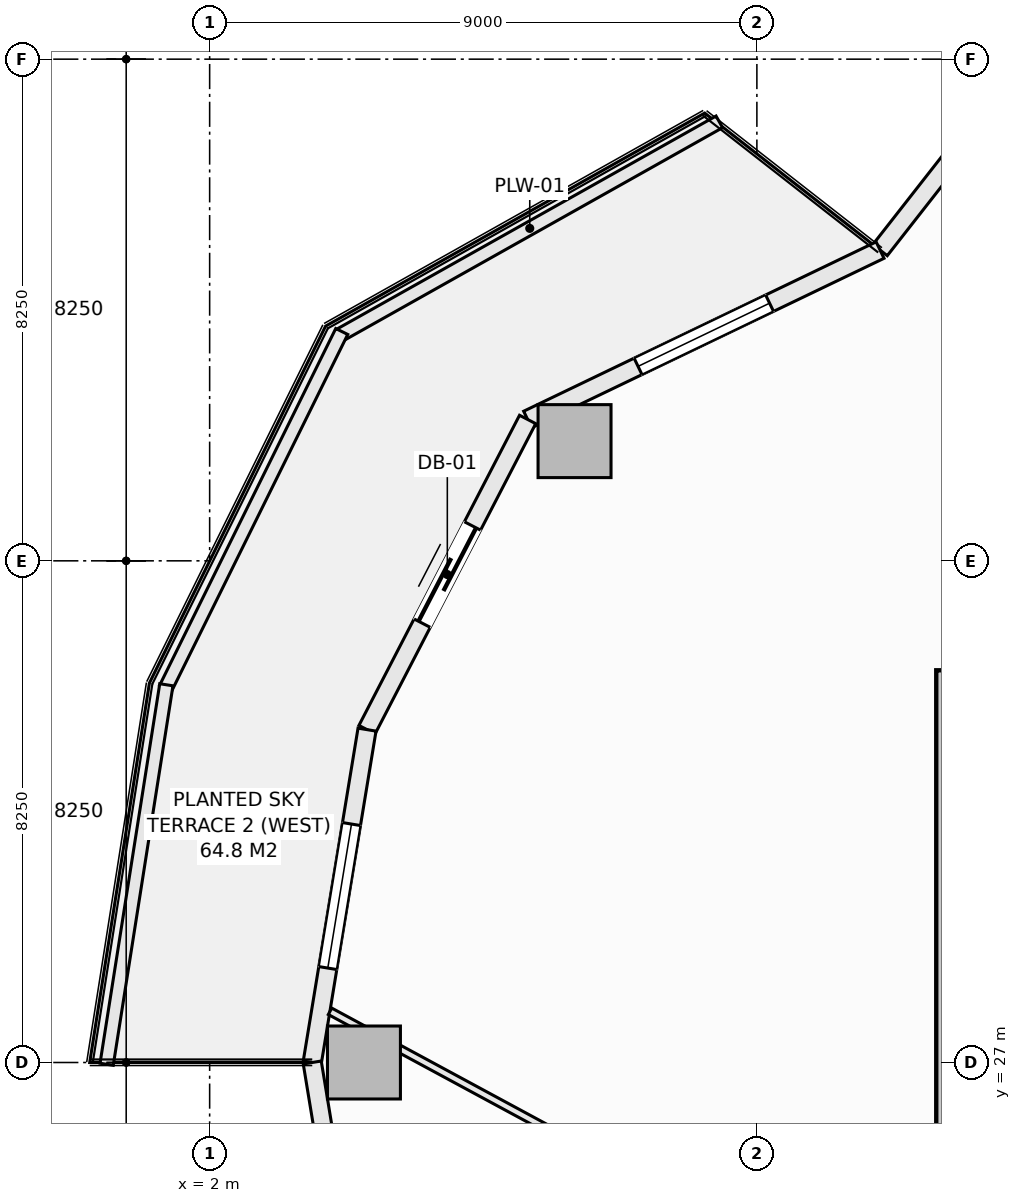
"""IFC4 building model, lengths in metres.
Left out: names, types, materials, properties, quantities, classifications, styles, units other than length and angle.
Written with IfcOpenShell. Run it as: python <this file> out.ifc"""

import sys

from ifc_helpers import new_model, si_unit, direction, frame, frame_2d, origin, origin_2d, place, context, subcontext, project, spatial, rectangle, extrude, element, fill, save


model = new_model("IFC4")
c1 = context("Model", 3, precision=1e-05, world=origin(), true_north=direction((0.0, 1.0)))
c2 = subcontext(c1, "Body", "Model", "MODEL_VIEW")
j1 = project(units=[si_unit("LENGTHUNIT", "METRE"), si_unit("PLANEANGLEUNIT", "RADIAN")], contexts=[c1])
p1 = place(None, origin())
s1 = spatial("IfcSite", under=j1, at=p1, CompositionType="ELEMENT")
p2 = place(p1, origin())
s2 = spatial("IfcBuilding", under=s1, at=p2, CompositionType="ELEMENT")
p3 = place(p2, frame((0.0, 0.0, 88.1)))
s3 = spatial("IfcBuildingStorey", under=s2, at=p3, CompositionType="ELEMENT", Elevation=88.1)
p4 = place(p3, frame((14.375, 20.55, -0.28), z_axis=(0.0, 0.0, 1.0), x_axis=(0.0, 1.0, 0.0)))
e1 = element("IfcWall", 1, at=p4, inside=s3, PredefinedType="SHEAR", context=c2, shape_type="SweptSolid", body=[
    extrude(rectangle(XDim=12.9, YDim=0.85, at=frame_2d((6.45, 0.0))), origin(), (0.0, 0.0, 1.0), 3.85),
])
for number, where, z_axis, x_axis in (
    (2, (8.001, 37.219, -0.28), (0.0, 0.0, 1.0), (1.0, 0.0, 0.0)),
    (3, (4.538, 27.0, -0.28), (0.0, 0.0, 1.0), (1.0, 0.0, 0.0)),
):
    element("IfcColumn", number, at=place(p3, frame(where, z_axis=z_axis, x_axis=x_axis)), inside=s3, PredefinedType="COLUMN", context=c2, shape_type="SweptSolid", body=[
        extrude(rectangle(XDim=1.2, YDim=1.2, at=origin_2d()), origin(), (0.0, 0.0, 1.0), 3.85),
    ])
p5 = place(p3, frame((13.026, 40.36, 0.0), z_axis=(0.0, 0.0, 1.0), x_axis=(0.616434798832, 0.78740595552, 0.0)))
e4 = element("IfcWall", 4, at=p5, inside=s3, PredefinedType="SOLIDWALL", context=c2, shape_type="SweptSolid", body=[
    extrude(rectangle(XDim=6.294, YDim=0.3, at=frame_2d((3.147, 0.0))), origin(), (0.0, 0.0, 1.0), 3.093),
])
p6 = place(p5, frame((1.947, 0.0, 0.85)))
e5 = element("IfcOpeningElement", 5, at=p6, cuts=e4, PredefinedType="OPENING", context=c2, shape_type="SweptSolid", body=[
    extrude(rectangle(XDim=2.4, YDim=1.9, at=frame_2d((1.2, 0.95))), frame((0.0, 0.16, 0.0), z_axis=(0.0, -1.0, 0.0), x_axis=(1.0, 0.0, 0.0)), (0.0, 0.0, 1.0), 0.32),
])
p7 = place(p3, frame((7.229, 37.575, 0.0), z_axis=(0.0, 0.0, 1.0), x_axis=(0.901354747727, 0.433081538224, 0.0)))
e6 = element("IfcWall", 6, at=p7, inside=s3, PredefinedType="SOLIDWALL", context=c2, shape_type="SweptSolid", body=[
    extrude(rectangle(XDim=6.431, YDim=0.3, at=frame_2d((3.215, 0.0))), origin(), (0.0, 0.0, 1.0), 3.093),
])
p8 = place(p7, frame((2.015, 0.0, 0.85)))
e7 = element("IfcOpeningElement", 7, at=p8, cuts=e6, PredefinedType="OPENING", context=c2, shape_type="SweptSolid", body=[
    extrude(rectangle(XDim=2.4, YDim=1.9, at=frame_2d((1.2, 0.95))), frame((0.0, 0.16, 0.0), z_axis=(0.0, -1.0, 0.0), x_axis=(1.0, 0.0, 0.0)), (0.0, 0.0, 1.0), 0.32),
])
p9 = place(p3, frame((4.588, 32.474, 0.0), z_axis=(0.0, 0.0, 1.0), x_axis=(0.459800981414, 0.888021991558, 0.0)))
e8 = element("IfcWall", 8, at=p9, inside=s3, PredefinedType="SOLIDWALL", context=c2, shape_type="SweptSolid", body=[
    extrude(rectangle(XDim=5.744, YDim=0.3, at=frame_2d((2.872, 0.0))), origin(), (0.0, 0.0, 1.0), 3.093),
])
p10 = place(p9, frame((1.972, 0.0, 0.0)))
e9 = element("IfcOpeningElement", 9, at=p10, cuts=e8, PredefinedType="OPENING", context=c2, shape_type="SweptSolid", body=[
    extrude(rectangle(XDim=1.8, YDim=2.25, at=frame_2d((0.9, 1.125))), frame((0.0, 0.16, 0.0), z_axis=(0.0, -1.0, 0.0), x_axis=(1.0, 0.0, 0.0)), (0.0, 0.0, 1.0), 0.32),
])
p11 = place(p3, frame((3.688, 27.0, 0.0), z_axis=(0.0, 0.0, 1.0), x_axis=(0.162386212206, 0.986727276447, 0.0)))
e10 = element("IfcWall", 10, at=p11, inside=s3, PredefinedType="SOLIDWALL", context=c2, shape_type="SweptSolid", body=[
    extrude(rectangle(XDim=5.548, YDim=0.3, at=frame_2d((2.774, 0.0))), origin(), (0.0, 0.0, 1.0), 3.093),
])
p12 = place(p11, frame((1.574, 0.0, 0.85)))
e11 = element("IfcOpeningElement", 11, at=p12, cuts=e10, PredefinedType="OPENING", context=c2, shape_type="SweptSolid", body=[
    extrude(rectangle(XDim=2.4, YDim=1.9, at=frame_2d((1.2, 0.95))), frame((0.0, 0.16, 0.0), z_axis=(0.0, -1.0, 0.0), x_axis=(1.0, 0.0, 0.0)), (0.0, 0.0, 1.0), 0.32),
])
p13 = place(p3, frame((3.688, 27.0, 0.0), z_axis=(0.0, 0.0, 1.0), x_axis=(0.162386212206, -0.986727276447, 0.0)))
e12 = element("IfcWall", 12, at=p13, inside=s3, PredefinedType="SOLIDWALL", context=c2, shape_type="SweptSolid", body=[
    extrude(rectangle(XDim=5.548, YDim=0.3, at=frame_2d((2.774, 0.0))), origin(), (0.0, 0.0, 1.0), 3.093),
])
p14 = place(p13, frame((1.574, 0.0, 0.85)))
e13 = element("IfcOpeningElement", 13, at=p14, cuts=e12, PredefinedType="OPENING", context=c2, shape_type="SweptSolid", body=[
    extrude(rectangle(XDim=2.4, YDim=1.9, at=frame_2d((1.2, 0.95))), frame((0.0, 0.16, 0.0), z_axis=(0.0, -1.0, 0.0), x_axis=(1.0, 0.0, 0.0)), (0.0, 0.0, 1.0), 0.32),
])
p15 = place(p3, frame((4.147, 38.966, 0.0), z_axis=(0.0, 0.0, 1.0), x_axis=(0.871775109335, 0.489906275468, 0.0)))
e14 = element("IfcWall", 14, at=p15, inside=s3, PredefinedType="PARAPET", context=c2, shape_type="SweptSolid", body=[
    extrude(rectangle(XDim=7.152, YDim=0.22, at=frame_2d((3.576, 0.0))), origin(), (0.0, 0.0, 1.0), 0.52),
])
p16 = place(p3, frame((1.275, 33.153, 0.0), z_axis=(0.0, 0.0, 1.0), x_axis=(0.442686636348, 0.89667638644, 0.0)))
e15 = element("IfcWall", 15, at=p16, inside=s3, PredefinedType="PARAPET", context=c2, shape_type="SweptSolid", body=[
    extrude(rectangle(XDim=6.545, YDim=0.22, at=frame_2d((3.272, 0.0))), origin(), (0.0, 0.0, 1.0), 0.52),
])
p17 = place(p3, frame((0.306, 26.971, 0.0), z_axis=(0.0, 0.0, 1.0), x_axis=(0.15545655238, 0.987842730561, 0.0)))
e16 = element("IfcWall", 16, at=p17, inside=s3, PredefinedType="PARAPET", context=c2, shape_type="SweptSolid", body=[
    extrude(rectangle(XDim=6.318, YDim=0.22, at=frame_2d((3.159, 0.0))), origin(), (0.0, 0.0, 1.0), 0.52),
])
p18 = place(p3, frame((3.98, 27.842, 0.0), z_axis=(0.0, 0.0, 1.0), x_axis=(0.87986629228, -0.475221324974, 0.0)))
e17 = element("IfcWall", 17, at=p18, inside=s3, PredefinedType="PARTITIONING", context=c2, shape_type="SweptSolid", body=[
    extrude(rectangle(XDim=11.329, YDim=0.12, at=frame_2d((5.665, 0.0))), origin(), (0.0, 0.0, 1.0), 2.934),
])
p19 = place(p8, origin())
e18 = element("IfcWindow", 18, at=p19, inside=s3, PartitioningType="SINGLE_PANEL", PredefinedType="WINDOW", context=c2, shape_type="SweptSolid", body=[
    extrude(rectangle(XDim=2.4, YDim=1.9, at=frame_2d((1.2, 0.95))), frame((0.0, 0.03, 0.0), z_axis=(0.0, -1.0, 0.0), x_axis=(1.0, 0.0, 0.0)), (0.0, 0.0, 1.0), 0.06),
])
fill(e7, e18)
p20 = place(p10, origin())
e19 = element("IfcDoor", 19, at=p20, inside=s3, OperationType="SLIDING_TO_LEFT", PredefinedType="DOOR", context=c2, shape_type="SweptSolid", body=[
    extrude(rectangle(XDim=1.8, YDim=2.25, at=frame_2d((0.9, 1.125))), frame((0.0, 0.025, 0.0), z_axis=(0.0, -1.0, 0.0), x_axis=(1.0, 0.0, 0.0)), (0.0, 0.0, 1.0), 0.05),
])
fill(e9, e19)
p21 = place(p12, origin())
e20 = element("IfcWindow", 20, at=p21, inside=s3, PartitioningType="SINGLE_PANEL", PredefinedType="WINDOW", context=c2, shape_type="SweptSolid", body=[
    extrude(rectangle(XDim=2.4, YDim=1.9, at=frame_2d((1.2, 0.95))), frame((0.0, 0.03, 0.0), z_axis=(0.0, -1.0, 0.0), x_axis=(1.0, 0.0, 0.0)), (0.0, 0.0, 1.0), 0.06),
])
fill(e11, e20)
save(model, sys.argv[1])
